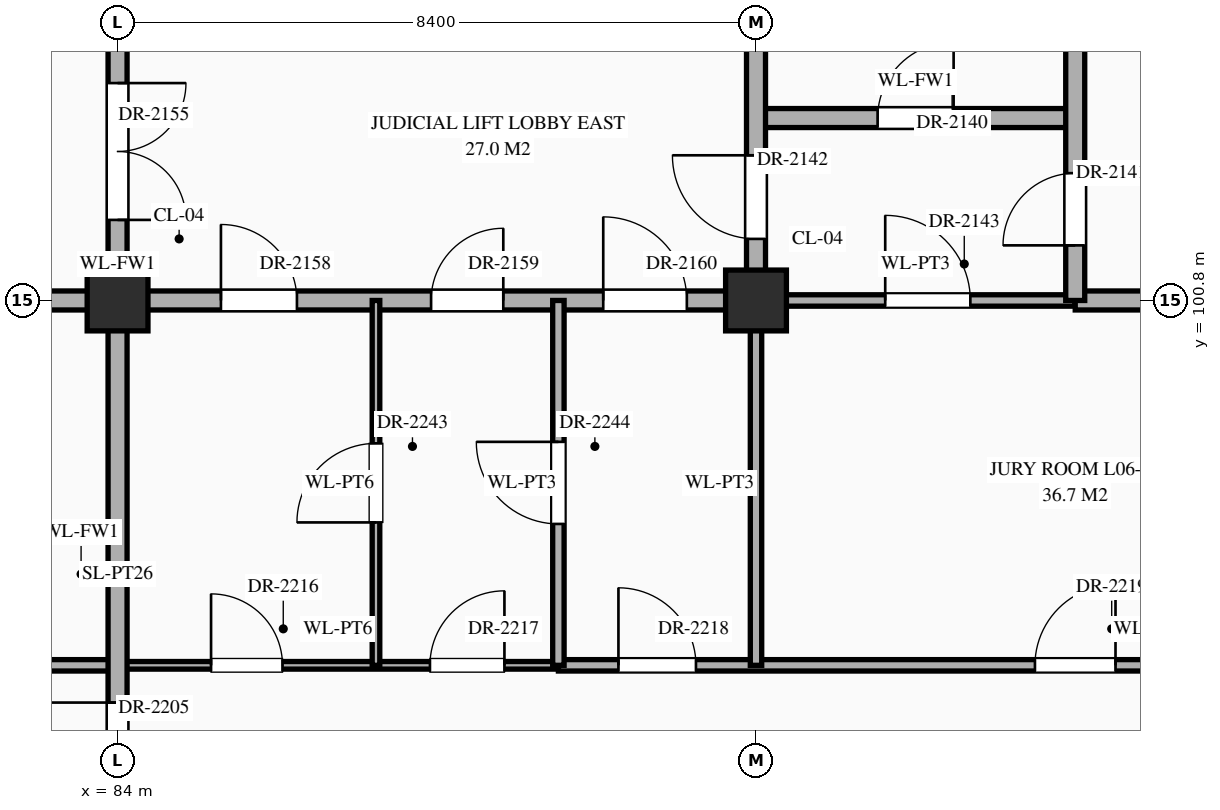
"""IFC4 building model, lengths in metres.
Left out: names, types, materials, properties, quantities, classifications, styles, units other than length and angle.
Written with IfcOpenShell. Run it as: python <this file> out.ifc"""

import sys

from ifc_helpers import new_model, si_unit, direction, frame, frame_2d, origin, origin_2d, place, context, subcontext, project, spatial, rectangle, extrude, element, fill, save


model = new_model("IFC4")
c1 = context("Model", 3, precision=1e-05, world=origin(), true_north=direction((0.0, 1.0)))
c2 = subcontext(c1, "Body", "Model", "MODEL_VIEW")
j1 = project(units=[si_unit("LENGTHUNIT", "METRE"), si_unit("PLANEANGLEUNIT", "RADIAN")], contexts=[c1])
p1 = place(None, origin())
s1 = spatial("IfcSite", under=j1, at=p1, CompositionType="ELEMENT")
p2 = place(p1, origin())
s2 = spatial("IfcBuilding", under=s1, at=p2, CompositionType="ELEMENT")
p3 = place(p2, frame((0.0, 0.0, 26.1)))
s3 = spatial("IfcBuildingStorey", under=s2, at=p3, CompositionType="ELEMENT", Elevation=26.1)
for number, where, z_axis, x_axis in (
    (1, (84.0, 100.8, 0.0), (0.0, 0.0, 1.0), (1.0, 0.0, 0.0)),
    (2, (92.4, 100.8, 0.0), (0.0, 0.0, 1.0), (1.0, 0.0, 0.0)),
):
    element("IfcColumn", number, at=place(p3, frame(where, z_axis=z_axis, x_axis=x_axis)), inside=s3, PredefinedType="COLUMN", context=c2, shape_type="SweptSolid", body=[
        extrude(rectangle(XDim=0.8, YDim=0.8, at=origin_2d()), origin(), (0.0, 0.0, 1.0), 4.5),
    ])
p4 = place(p3, frame((56.2, 96.0, 0.0), z_axis=(0.0, 0.0, 1.0), x_axis=(1.0, 0.0, 0.0)))
e3 = element("IfcWall", 3, at=p4, inside=s3, PredefinedType="STANDARD", context=c2, shape_type="SweptSolid", body=[
    extrude(rectangle(XDim=27.8, YDim=0.15, at=frame_2d((13.9, 0.0))), origin(), (0.0, 0.0, 1.0), 4.24),
])
p5 = place(p4, frame((0.8, 0.0, 0.0)))
e4 = element("IfcOpeningElement", 4, at=p5, cuts=e3, PredefinedType="OPENING", context=c2, shape_type="SweptSolid", body=[
    extrude(rectangle(XDim=1.0, YDim=2.25, at=frame_2d((0.5, 1.125))), frame((0.0, 0.087, 0.0), z_axis=(0.0, -1.0, 0.0), x_axis=(1.0, 0.0, 0.0)), (0.0, 0.0, 1.0), 0.174),
])
p6 = place(p4, frame((6.28, 0.0, 0.0)))
e5 = element("IfcOpeningElement", 5, at=p6, cuts=e3, PredefinedType="OPENING", context=c2, shape_type="SweptSolid", body=[
    extrude(rectangle(XDim=1.04, YDim=2.2, at=frame_2d((0.52, 1.1))), frame((0.0, 0.087, 0.0), z_axis=(0.0, -1.0, 0.0), x_axis=(1.0, 0.0, 0.0)), (0.0, 0.0, 1.0), 0.174),
])
p7 = place(p4, frame((14.66, 0.0, 0.0)))
e6 = element("IfcOpeningElement", 6, at=p7, cuts=e3, PredefinedType="OPENING", context=c2, shape_type="SweptSolid", body=[
    extrude(rectangle(XDim=1.08, YDim=2.25, at=frame_2d((0.54, 1.125))), frame((0.0, 0.087, 0.0), z_axis=(0.0, -1.0, 0.0), x_axis=(1.0, 0.0, 0.0)), (0.0, 0.0, 1.0), 0.174),
])
p8 = place(p4, frame((23.04, 0.0, 0.0)))
e7 = element("IfcOpeningElement", 7, at=p8, cuts=e3, PredefinedType="OPENING", context=c2, shape_type="SweptSolid", body=[
    extrude(rectangle(XDim=1.12, YDim=2.25, at=frame_2d((0.56, 1.125))), frame((0.0, 0.087, 0.0), z_axis=(0.0, -1.0, 0.0), x_axis=(1.0, 0.0, 0.0)), (0.0, 0.0, 1.0), 0.174),
])
p9 = place(p3, frame((84.0, 96.0, 0.0), z_axis=(0.0, 0.0, 1.0), x_axis=(1.0, 0.0, 0.0)))
e8 = element("IfcWall", 8, at=p9, inside=s3, PredefinedType="STANDARD", context=c2, shape_type="SweptSolid", body=[
    extrude(rectangle(XDim=5.8, YDim=0.1, at=frame_2d((2.9, 0.0))), origin(), (0.0, 0.0, 1.0), 4.24),
])
p10 = place(p9, frame((1.23, 0.0, 0.0)))
e9 = element("IfcOpeningElement", 9, at=p10, cuts=e8, PredefinedType="OPENING", context=c2, shape_type="SweptSolid", body=[
    extrude(rectangle(XDim=0.94, YDim=2.3, at=frame_2d((0.47, 1.15))), frame((0.0, 0.062, 0.0), z_axis=(0.0, -1.0, 0.0), x_axis=(1.0, 0.0, 0.0)), (0.0, 0.0, 1.0), 0.124),
])
p11 = place(p9, frame((4.11, 0.0, 0.0)))
e10 = element("IfcOpeningElement", 10, at=p11, cuts=e8, PredefinedType="OPENING", context=c2, shape_type="SweptSolid", body=[
    extrude(rectangle(XDim=0.98, YDim=2.35, at=frame_2d((0.49, 1.175))), frame((0.0, 0.062, 0.0), z_axis=(0.0, -1.0, 0.0), x_axis=(1.0, 0.0, 0.0)), (0.0, 0.0, 1.0), 0.124),
])
p12 = place(p3, frame((89.8, 96.0, 0.0), z_axis=(0.0, 0.0, 1.0), x_axis=(1.0, 0.0, 0.0)))
e11 = element("IfcWall", 11, at=p12, inside=s3, PredefinedType="STANDARD", context=c2, shape_type="SweptSolid", body=[
    extrude(rectangle(XDim=19.4, YDim=0.15, at=frame_2d((9.7, 0.0))), origin(), (0.0, 0.0, 1.0), 4.24),
])
p13 = place(p12, frame((0.79, 0.0, 0.0)))
e12 = element("IfcOpeningElement", 12, at=p13, cuts=e11, PredefinedType="OPENING", context=c2, shape_type="SweptSolid", body=[
    extrude(rectangle(XDim=1.02, YDim=2.4, at=frame_2d((0.51, 1.2))), frame((0.0, 0.087, 0.0), z_axis=(0.0, -1.0, 0.0), x_axis=(1.0, 0.0, 0.0)), (0.0, 0.0, 1.0), 0.174),
])
p14 = place(p12, frame((6.27, 0.0, 0.0)))
e13 = element("IfcOpeningElement", 13, at=p14, cuts=e11, PredefinedType="OPENING", context=c2, shape_type="SweptSolid", body=[
    extrude(rectangle(XDim=1.06, YDim=2.4, at=frame_2d((0.53, 1.2))), frame((0.0, 0.087, 0.0), z_axis=(0.0, -1.0, 0.0), x_axis=(1.0, 0.0, 0.0)), (0.0, 0.0, 1.0), 0.174),
])
p15 = place(p12, frame((14.63, 0.0, 0.0)))
e14 = element("IfcOpeningElement", 14, at=p15, cuts=e11, PredefinedType="OPENING", context=c2, shape_type="SweptSolid", body=[
    extrude(rectangle(XDim=1.14, YDim=2.4, at=frame_2d((0.57, 1.2))), frame((0.0, 0.087, 0.0), z_axis=(0.0, -1.0, 0.0), x_axis=(1.0, 0.0, 0.0)), (0.0, 0.0, 1.0), 0.174),
])
p16 = place(p3, frame((75.6, 100.8, 0.0), z_axis=(0.0, 0.0, 1.0), x_axis=(1.0, 0.0, 0.0)))
e15 = element("IfcWall", 15, at=p16, inside=s3, PredefinedType="STANDARD", context=c2, shape_type="SweptSolid", body=[
    extrude(rectangle(XDim=16.8, YDim=0.25, at=frame_2d((8.4, 0.0))), origin(), (0.0, 0.0, 1.0), 3.39),
])
p17 = place(p16, frame((3.725, 0.0, 0.0)))
e16 = element("IfcOpeningElement", 16, at=p17, cuts=e15, PredefinedType="OPENING", context=c2, shape_type="SweptSolid", body=[
    extrude(rectangle(XDim=0.95, YDim=2.15, at=frame_2d((0.475, 1.075))), frame((0.0, 0.137, 0.0), z_axis=(0.0, -1.0, 0.0), x_axis=(1.0, 0.0, 0.0)), (0.0, 0.0, 1.0), 0.274),
])
p18 = place(p16, frame((9.76, 0.0, 0.0)))
e17 = element("IfcOpeningElement", 17, at=p18, cuts=e15, PredefinedType="OPENING", context=c2, shape_type="SweptSolid", body=[
    extrude(rectangle(XDim=1.0, YDim=2.2, at=frame_2d((0.5, 1.1))), frame((0.0, 0.137, 0.0), z_axis=(0.0, -1.0, 0.0), x_axis=(1.0, 0.0, 0.0)), (0.0, 0.0, 1.0), 0.274),
])
p19 = place(p16, frame((12.525, 0.0, 0.0)))
e18 = element("IfcOpeningElement", 18, at=p19, cuts=e15, PredefinedType="OPENING", context=c2, shape_type="SweptSolid", body=[
    extrude(rectangle(XDim=0.95, YDim=2.15, at=frame_2d((0.475, 1.075))), frame((0.0, 0.137, 0.0), z_axis=(0.0, -1.0, 0.0), x_axis=(1.0, 0.0, 0.0)), (0.0, 0.0, 1.0), 0.274),
])
p20 = place(p16, frame((14.79, 0.0, 0.0)))
e19 = element("IfcOpeningElement", 19, at=p20, cuts=e15, PredefinedType="OPENING", context=c2, shape_type="SweptSolid", body=[
    extrude(rectangle(XDim=1.1, YDim=2.2, at=frame_2d((0.55, 1.1))), frame((0.0, 0.137, 0.0), z_axis=(0.0, -1.0, 0.0), x_axis=(1.0, 0.0, 0.0)), (0.0, 0.0, 1.0), 0.274),
])
p21 = place(p3, frame((92.4, 100.8, 0.0), z_axis=(0.0, 0.0, 1.0), x_axis=(1.0, 0.0, 0.0)))
e20 = element("IfcWall", 20, at=p21, inside=s3, PredefinedType="STANDARD", context=c2, shape_type="SweptSolid", body=[
    extrude(rectangle(XDim=4.2, YDim=0.15, at=frame_2d((2.1, 0.0))), origin(), (0.0, 0.0, 1.0), 3.39),
])
p22 = place(p21, frame((1.7, 0.0, 0.0)))
e21 = element("IfcOpeningElement", 21, at=p22, cuts=e20, PredefinedType="OPENING", context=c2, shape_type="SweptSolid", body=[
    extrude(rectangle(XDim=1.12, YDim=2.25, at=frame_2d((0.56, 1.125))), frame((0.0, 0.087, 0.0), z_axis=(0.0, -1.0, 0.0), x_axis=(1.0, 0.0, 0.0)), (0.0, 0.0, 1.0), 0.174),
])
p23 = place(p3, frame((96.6, 100.8, 0.0), z_axis=(0.0, 0.0, 1.0), x_axis=(1.0, 0.0, 0.0)))
e22 = element("IfcWall", 22, at=p23, inside=s3, PredefinedType="STANDARD", context=c2, shape_type="SweptSolid", body=[
    extrude(rectangle(XDim=12.6, YDim=0.25, at=frame_2d((6.3, 0.0))), origin(), (0.0, 0.0, 1.0), 3.39),
])
p24 = place(p23, frame((7.9, 0.0, 0.0)))
e23 = element("IfcOpeningElement", 23, at=p24, cuts=e22, PredefinedType="OPENING", context=c2, shape_type="SweptSolid", body=[
    extrude(rectangle(XDim=1.0, YDim=2.2, at=frame_2d((0.5, 1.1))), frame((0.0, 0.137, 0.0), z_axis=(0.0, -1.0, 0.0), x_axis=(1.0, 0.0, 0.0)), (0.0, 0.0, 1.0), 0.274),
])
p25 = place(p3, frame((92.4, 103.2, 0.0), z_axis=(0.0, 0.0, 1.0), x_axis=(1.0, 0.0, 0.0)))
e24 = element("IfcWall", 24, at=p25, inside=s3, PredefinedType="STANDARD", context=c2, shape_type="SweptSolid", body=[
    extrude(rectangle(XDim=4.2, YDim=0.25, at=frame_2d((2.1, 0.0))), origin(), (0.0, 0.0, 1.0), 4.24),
])
p26 = place(p25, frame((1.6, 0.0, 0.0)))
e25 = element("IfcOpeningElement", 25, at=p26, cuts=e24, PredefinedType="OPENING", context=c2, shape_type="SweptSolid", body=[
    extrude(rectangle(XDim=1.0, YDim=2.2, at=frame_2d((0.5, 1.1))), frame((0.0, 0.137, 0.0), z_axis=(0.0, -1.0, 0.0), x_axis=(1.0, 0.0, 0.0)), (0.0, 0.0, 1.0), 0.274),
])
p27 = place(p3, frame((84.0, 79.24, 0.0), z_axis=(0.0, 0.0, 1.0), x_axis=(0.0, 1.0, 0.0)))
e26 = element("IfcWall", 26, at=p27, inside=s3, PredefinedType="STANDARD", context=c2, shape_type="SweptSolid", body=[
    extrude(rectangle(XDim=35.92, YDim=0.25, at=frame_2d((17.96, 0.0))), origin(), (0.0, 0.0, 1.0), 3.49),
])
p28 = place(p27, frame((22.62, 0.0, 0.0)))
e27 = element("IfcOpeningElement", 27, at=p28, cuts=e26, PredefinedType="OPENING", context=c2, shape_type="SweptSolid", body=[
    extrude(rectangle(XDim=1.8, YDim=2.35, at=frame_2d((0.9, 1.175))), frame((0.0, 0.137, 0.0), z_axis=(0.0, -1.0, 0.0), x_axis=(1.0, 0.0, 0.0)), (0.0, 0.0, 1.0), 0.274),
])
p29 = place(p27, frame((12.5, 0.0, 0.0)))
e28 = element("IfcOpeningElement", 28, at=p29, cuts=e26, PredefinedType="OPENING", context=c2, shape_type="SweptSolid", body=[
    extrude(rectangle(XDim=1.0, YDim=2.2, at=frame_2d((0.5, 1.1))), frame((0.0, 0.137, 0.0), z_axis=(0.0, -1.0, 0.0), x_axis=(1.0, 0.0, 0.0)), (0.0, 0.0, 1.0), 0.274),
])
p30 = place(p27, frame((15.17, 0.0, 0.0)))
e29 = element("IfcOpeningElement", 29, at=p30, cuts=e26, PredefinedType="OPENING", context=c2, shape_type="SweptSolid", body=[
    extrude(rectangle(XDim=1.1, YDim=2.2, at=frame_2d((0.55, 1.1))), frame((0.0, 0.137, 0.0), z_axis=(0.0, -1.0, 0.0), x_axis=(1.0, 0.0, 0.0)), (0.0, 0.0, 1.0), 0.274),
])
p31 = place(p27, frame((26.05, 0.0, 0.0)))
e30 = element("IfcOpeningElement", 30, at=p31, cuts=e26, PredefinedType="OPENING", context=c2, shape_type="SweptSolid", body=[
    extrude(rectangle(XDim=1.5, YDim=2.25, at=frame_2d((0.75, 1.125))), frame((0.0, 0.137, 0.0), z_axis=(0.0, -1.0, 0.0), x_axis=(1.0, 0.0, 0.0)), (0.0, 0.0, 1.0), 0.274),
])
p32 = place(p27, frame((29.645, 0.0, 0.0)))
e31 = element("IfcOpeningElement", 31, at=p32, cuts=e26, PredefinedType="OPENING", context=c2, shape_type="SweptSolid", body=[
    extrude(rectangle(XDim=0.95, YDim=2.15, at=frame_2d((0.475, 1.075))), frame((0.0, 0.137, 0.0), z_axis=(0.0, -1.0, 0.0), x_axis=(1.0, 0.0, 0.0)), (0.0, 0.0, 1.0), 0.274),
])
p33 = place(p27, frame((5.325, 0.0, 0.0)))
e32 = element("IfcOpeningElement", 32, at=p33, cuts=e26, PredefinedType="OPENING", context=c2, shape_type="SweptSolid", body=[
    extrude(rectangle(XDim=0.95, YDim=2.15, at=frame_2d((0.475, 1.075))), frame((0.0, 0.137, 0.0), z_axis=(0.0, -1.0, 0.0), x_axis=(1.0, 0.0, 0.0)), (0.0, 0.0, 1.0), 0.274),
])
p34 = place(p3, frame((87.4, 96.0, 0.0), z_axis=(0.0, 0.0, 1.0), x_axis=(0.0, 1.0, 0.0)))
e33 = element("IfcWall", 33, at=p34, inside=s3, PredefinedType="STANDARD", context=c2, shape_type="SweptSolid", body=[
    extrude(rectangle(XDim=4.8, YDim=0.1, at=frame_2d((2.4, 0.0))), origin(), (0.0, 0.0, 1.0), 4.24),
])
p35 = place(p34, frame((1.88, 0.0, 0.0)))
e34 = element("IfcOpeningElement", 34, at=p35, cuts=e33, PredefinedType="OPENING", context=c2, shape_type="SweptSolid", body=[
    extrude(rectangle(XDim=1.04, YDim=2.2, at=frame_2d((0.52, 1.1))), frame((0.0, 0.062, 0.0), z_axis=(0.0, -1.0, 0.0), x_axis=(1.0, 0.0, 0.0)), (0.0, 0.0, 1.0), 0.124),
])
p36 = place(p3, frame((89.8, 96.0, 0.0), z_axis=(0.0, 0.0, 1.0), x_axis=(0.0, 1.0, 0.0)))
e35 = element("IfcWall", 35, at=p36, inside=s3, PredefinedType="STANDARD", context=c2, shape_type="SweptSolid", body=[
    extrude(rectangle(XDim=4.8, YDim=0.15, at=frame_2d((2.4, 0.0))), origin(), (0.0, 0.0, 1.0), 4.24),
])
p37 = place(p36, frame((1.86, 0.0, 0.0)))
e36 = element("IfcOpeningElement", 36, at=p37, cuts=e35, PredefinedType="OPENING", context=c2, shape_type="SweptSolid", body=[
    extrude(rectangle(XDim=1.08, YDim=2.25, at=frame_2d((0.54, 1.125))), frame((0.0, 0.087, 0.0), z_axis=(0.0, -1.0, 0.0), x_axis=(1.0, 0.0, 0.0)), (0.0, 0.0, 1.0), 0.174),
])
p38 = place(p3, frame((92.4, 96.0, 0.0), z_axis=(0.0, 0.0, 1.0), x_axis=(0.0, 1.0, 0.0)))
e37 = element("IfcWall", 37, at=p38, inside=s3, PredefinedType="STANDARD", context=c2, shape_type="SweptSolid", body=[
    extrude(rectangle(XDim=4.8, YDim=0.15, at=frame_2d((2.4, 0.0))), origin(), (0.0, 0.0, 1.0), 3.49),
])
p39 = place(p3, frame((92.4, 100.8, 0.0), z_axis=(0.0, 0.0, 1.0), x_axis=(0.0, 1.0, 0.0)))
e38 = element("IfcWall", 38, at=p39, inside=s3, PredefinedType="STANDARD", context=c2, shape_type="SweptSolid", body=[
    extrude(rectangle(XDim=3.6, YDim=0.25, at=frame_2d((1.8, 0.0))), origin(), (0.0, 0.0, 1.0), 3.49),
])
p40 = place(p39, frame((0.81, 0.0, 0.0)))
e39 = element("IfcOpeningElement", 39, at=p40, cuts=e38, PredefinedType="OPENING", context=c2, shape_type="SweptSolid", body=[
    extrude(rectangle(XDim=1.1, YDim=2.2, at=frame_2d((0.55, 1.1))), frame((0.0, 0.137, 0.0), z_axis=(0.0, -1.0, 0.0), x_axis=(1.0, 0.0, 0.0)), (0.0, 0.0, 1.0), 0.274),
])
p41 = place(p3, frame((96.6, 100.8, 0.0), z_axis=(0.0, 0.0, 1.0), x_axis=(0.0, 1.0, 0.0)))
e40 = element("IfcWall", 40, at=p41, inside=s3, PredefinedType="STANDARD", context=c2, shape_type="SweptSolid", body=[
    extrude(rectangle(XDim=3.6, YDim=0.25, at=frame_2d((1.8, 0.0))), origin(), (0.0, 0.0, 1.0), 3.89),
])
p42 = place(p41, frame((0.725, 0.0, 0.0)))
e41 = element("IfcOpeningElement", 41, at=p42, cuts=e40, PredefinedType="OPENING", context=c2, shape_type="SweptSolid", body=[
    extrude(rectangle(XDim=0.95, YDim=2.15, at=frame_2d((0.475, 1.075))), frame((0.0, 0.137, 0.0), z_axis=(0.0, -1.0, 0.0), x_axis=(1.0, 0.0, 0.0)), (0.0, 0.0, 1.0), 0.274),
])
p43 = place(p26, origin())
e42 = element("IfcDoor", 42, at=p43, inside=s3, OperationType="SINGLE_SWING_RIGHT", PredefinedType="DOOR", context=c2, shape_type="SweptSolid", body=[
    extrude(rectangle(XDim=1.0, YDim=2.2, at=frame_2d((0.5, 1.1))), frame((0.0, 0.025, 0.0), z_axis=(0.0, -1.0, 0.0), x_axis=(1.0, 0.0, 0.0)), (0.0, 0.0, 1.0), 0.05),
])
fill(e25, e42)
p44 = place(p42, origin())
e43 = element("IfcDoor", 43, at=p44, inside=s3, OperationType="SINGLE_SWING_LEFT", PredefinedType="DOOR", context=c2, shape_type="SweptSolid", body=[
    extrude(rectangle(XDim=0.95, YDim=2.15, at=frame_2d((0.475, 1.075))), frame((0.0, 0.025, 0.0), z_axis=(0.0, -1.0, 0.0), x_axis=(1.0, 0.0, 0.0)), (0.0, 0.0, 1.0), 0.05),
])
fill(e41, e43)
p45 = place(p40, origin())
e44 = element("IfcDoor", 44, at=p45, inside=s3, OperationType="SINGLE_SWING_RIGHT", PredefinedType="DOOR", context=c2, shape_type="SweptSolid", body=[
    extrude(rectangle(XDim=1.1, YDim=2.2, at=frame_2d((0.55, 1.1))), frame((0.0, 0.025, 0.0), z_axis=(0.0, -1.0, 0.0), x_axis=(1.0, 0.0, 0.0)), (0.0, 0.0, 1.0), 0.05),
])
fill(e39, e44)
p46 = place(p22, origin())
e45 = element("IfcDoor", 45, at=p46, inside=s3, OperationType="SINGLE_SWING_LEFT", PredefinedType="DOOR", context=c2, shape_type="SweptSolid", body=[
    extrude(rectangle(XDim=1.12, YDim=2.25, at=frame_2d((0.56, 1.125))), frame((0.0, 0.025, 0.0), z_axis=(0.0, -1.0, 0.0), x_axis=(1.0, 0.0, 0.0)), (0.0, 0.0, 1.0), 0.05),
])
fill(e21, e45)
p47 = place(p28, frame((1.8, 0.0, 0.0), z_axis=(0.0, 0.0, 1.0), x_axis=(-1.0, 0.0, 0.0)))
e46 = element("IfcDoor", 46, at=p47, inside=s3, OperationType="DOUBLE_DOOR_SINGLE_SWING", PredefinedType="DOOR", context=c2, shape_type="SweptSolid", body=[
    extrude(rectangle(XDim=1.8, YDim=2.35, at=frame_2d((0.9, 1.175))), frame((0.0, 0.025, 0.0), z_axis=(0.0, -1.0, 0.0), x_axis=(1.0, 0.0, 0.0)), (0.0, 0.0, 1.0), 0.05),
])
fill(e27, e46)
p48 = place(p18, origin())
e47 = element("IfcDoor", 47, at=p48, inside=s3, OperationType="SINGLE_SWING_LEFT", PredefinedType="DOOR", context=c2, shape_type="SweptSolid", body=[
    extrude(rectangle(XDim=1.0, YDim=2.2, at=frame_2d((0.5, 1.1))), frame((0.0, 0.025, 0.0), z_axis=(0.0, -1.0, 0.0), x_axis=(1.0, 0.0, 0.0)), (0.0, 0.0, 1.0), 0.05),
])
fill(e17, e47)
p49 = place(p19, origin())
e48 = element("IfcDoor", 48, at=p49, inside=s3, OperationType="SINGLE_SWING_RIGHT", PredefinedType="DOOR", context=c2, shape_type="SweptSolid", body=[
    extrude(rectangle(XDim=0.95, YDim=2.15, at=frame_2d((0.475, 1.075))), frame((0.0, 0.025, 0.0), z_axis=(0.0, -1.0, 0.0), x_axis=(1.0, 0.0, 0.0)), (0.0, 0.0, 1.0), 0.05),
])
fill(e18, e48)
p50 = place(p20, origin())
e49 = element("IfcDoor", 49, at=p50, inside=s3, OperationType="SINGLE_SWING_LEFT", PredefinedType="DOOR", context=c2, shape_type="SweptSolid", body=[
    extrude(rectangle(XDim=1.1, YDim=2.2, at=frame_2d((0.55, 1.1))), frame((0.0, 0.025, 0.0), z_axis=(0.0, -1.0, 0.0), x_axis=(1.0, 0.0, 0.0)), (0.0, 0.0, 1.0), 0.05),
])
fill(e19, e49)
p51 = place(p30, origin())
e50 = element("IfcDoor", 50, at=p51, inside=s3, OperationType="SINGLE_SWING_RIGHT", PredefinedType="DOOR", context=c2, shape_type="SweptSolid", body=[
    extrude(rectangle(XDim=1.1, YDim=2.2, at=frame_2d((0.55, 1.1))), frame((0.0, 0.025, 0.0), z_axis=(0.0, -1.0, 0.0), x_axis=(1.0, 0.0, 0.0)), (0.0, 0.0, 1.0), 0.05),
])
fill(e29, e50)
p52 = place(p10, origin())
e51 = element("IfcDoor", 51, at=p52, inside=s3, OperationType="SINGLE_SWING_LEFT", PredefinedType="DOOR", context=c2, shape_type="SweptSolid", body=[
    extrude(rectangle(XDim=0.94, YDim=2.3, at=frame_2d((0.47, 1.15))), frame((0.0, 0.025, 0.0), z_axis=(0.0, -1.0, 0.0), x_axis=(1.0, 0.0, 0.0)), (0.0, 0.0, 1.0), 0.05),
])
fill(e9, e51)
p53 = place(p11, origin())
e52 = element("IfcDoor", 52, at=p53, inside=s3, OperationType="SINGLE_SWING_RIGHT", PredefinedType="DOOR", context=c2, shape_type="SweptSolid", body=[
    extrude(rectangle(XDim=0.98, YDim=2.35, at=frame_2d((0.49, 1.175))), frame((0.0, 0.025, 0.0), z_axis=(0.0, -1.0, 0.0), x_axis=(1.0, 0.0, 0.0)), (0.0, 0.0, 1.0), 0.05),
])
fill(e10, e52)
p54 = place(p13, origin())
e53 = element("IfcDoor", 53, at=p54, inside=s3, OperationType="SINGLE_SWING_LEFT", PredefinedType="DOOR", context=c2, shape_type="SweptSolid", body=[
    extrude(rectangle(XDim=1.02, YDim=2.4, at=frame_2d((0.51, 1.2))), frame((0.0, 0.025, 0.0), z_axis=(0.0, -1.0, 0.0), x_axis=(1.0, 0.0, 0.0)), (0.0, 0.0, 1.0), 0.05),
])
fill(e12, e53)
p55 = place(p14, origin())
e54 = element("IfcDoor", 54, at=p55, inside=s3, OperationType="SINGLE_SWING_RIGHT", PredefinedType="DOOR", context=c2, shape_type="SweptSolid", body=[
    extrude(rectangle(XDim=1.06, YDim=2.4, at=frame_2d((0.53, 1.2))), frame((0.0, 0.025, 0.0), z_axis=(0.0, -1.0, 0.0), x_axis=(1.0, 0.0, 0.0)), (0.0, 0.0, 1.0), 0.05),
])
fill(e13, e54)
p56 = place(p35, origin())
e55 = element("IfcDoor", 55, at=p56, inside=s3, OperationType="SINGLE_SWING_LEFT", PredefinedType="DOOR", context=c2, shape_type="SweptSolid", body=[
    extrude(rectangle(XDim=1.04, YDim=2.2, at=frame_2d((0.52, 1.1))), frame((0.0, 0.025, 0.0), z_axis=(0.0, -1.0, 0.0), x_axis=(1.0, 0.0, 0.0)), (0.0, 0.0, 1.0), 0.05),
])
fill(e34, e55)
p57 = place(p37, origin())
e56 = element("IfcDoor", 56, at=p57, inside=s3, OperationType="SINGLE_SWING_RIGHT", PredefinedType="DOOR", context=c2, shape_type="SweptSolid", body=[
    extrude(rectangle(XDim=1.08, YDim=2.25, at=frame_2d((0.54, 1.125))), frame((0.0, 0.025, 0.0), z_axis=(0.0, -1.0, 0.0), x_axis=(1.0, 0.0, 0.0)), (0.0, 0.0, 1.0), 0.05),
])
fill(e36, e56)
save(model, sys.argv[1])
